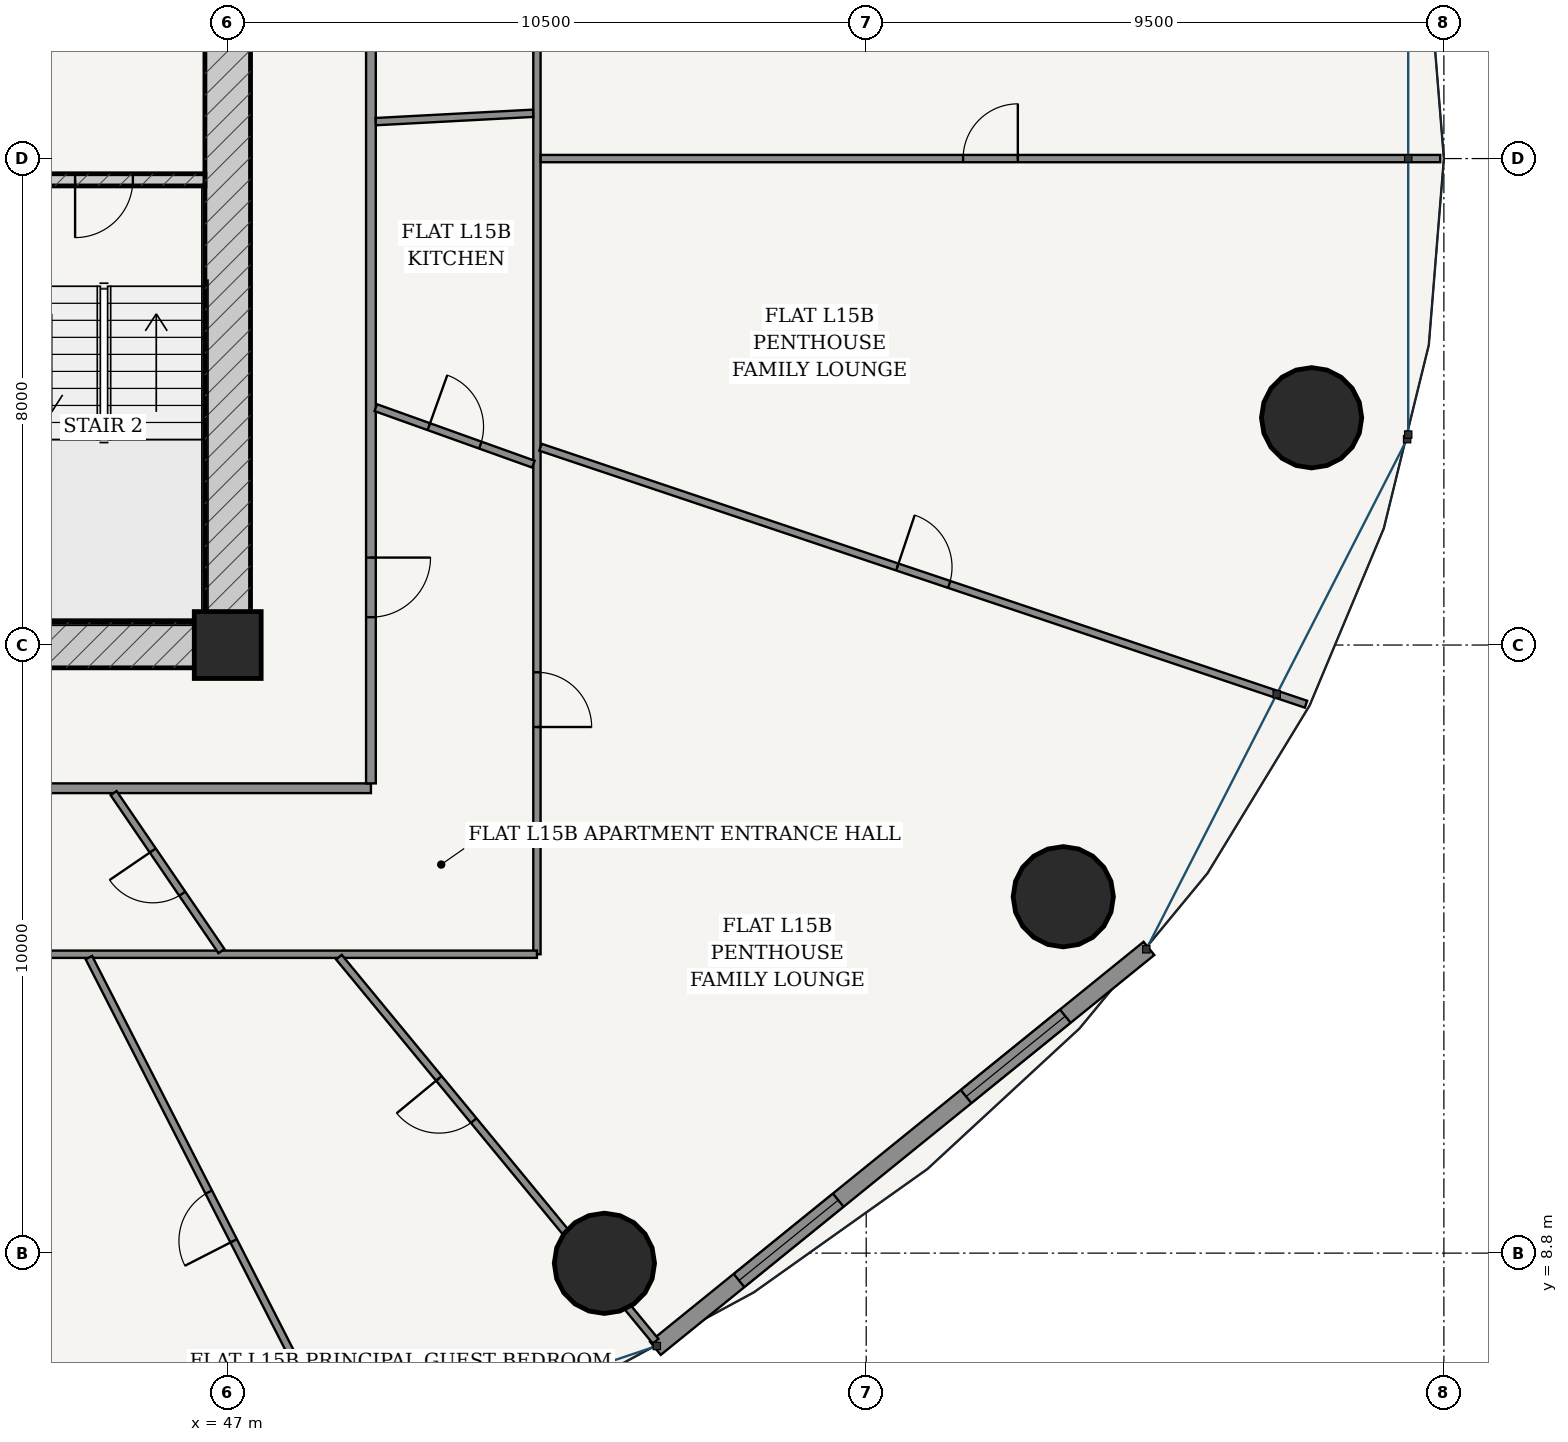
"""IFC4 building model, lengths in metres.
Left out: names, types, materials, properties, quantities, classifications, styles, units other than length and angle.
Written with IfcOpenShell. Run it as: python <this file> out.ifc"""

import sys

from ifc_helpers import new_model, si_unit, direction, frame, frame_2d, origin, origin_2d, place, context, subcontext, project, spatial, rectangle, hollow_circle, extrude, source, transform, mapped, element, fill, save


model = new_model("IFC4")
c1 = context("Model", 3, precision=1e-05, world=origin(), true_north=direction((-0.2419218956, 0.970295726276)))
c2 = subcontext(c1, "Body", "Model", "MODEL_VIEW")
j1 = project(units=[si_unit("LENGTHUNIT", "METRE"), si_unit("PLANEANGLEUNIT", "RADIAN")], contexts=[c1])
p1 = place(None, origin())
s1 = spatial("IfcSite", under=j1, at=p1, CompositionType="ELEMENT")
p2 = place(p1, origin())
s2 = spatial("IfcBuilding", under=s1, at=p2, CompositionType="ELEMENT")
p3 = place(p2, frame((0.0, 0.0, 60.0)))
s3 = spatial("IfcBuildingStorey", under=s2, at=p3, CompositionType="ELEMENT", Elevation=60.0)
p4 = place(p3, frame((47.0, 18.8, 0.0), z_axis=(0.0, 0.0, 1.0), x_axis=(1.0, 0.0, 0.0)))
e1 = element("IfcColumn", 1, at=p4, inside=s3, PredefinedType="COLUMN", context=c2, shape_type="SweptSolid", body=[
    extrude(rectangle(XDim=1.1, YDim=1.1, at=origin_2d()), origin(), (0.0, 0.0, 1.0), 3.6),
])
p5 = place(p3, frame((28.625, 18.8, 0.0), z_axis=(0.0, 0.0, 1.0), x_axis=(1.0, 0.0, 0.0)))
e2 = element("IfcWall", 2, at=p5, inside=s3, PredefinedType="SHEAR", context=c2, shape_type="SweptSolid", body=[
    extrude(rectangle(XDim=18.75, YDim=0.75, at=frame_2d((9.375, 0.0))), origin(), (0.0, 0.0, 1.0), 3.32),
])
p6 = place(p5, frame((8.95, 0.0, 0.0)))
e3 = element("IfcOpeningElement", 3, at=p6, cuts=e2, PredefinedType="OPENING", context=c2, shape_type="SweptSolid", body=[
    extrude(rectangle(XDim=0.85, YDim=2.1, at=frame_2d((0.425, 1.05))), frame((0.0, 0.385, 0.0), z_axis=(0.0, -1.0, 0.0), x_axis=(1.0, 0.0, 0.0)), (0.0, 0.0, 1.0), 0.77),
])
p7 = place(p3, frame((47.0, 19.175, 0.0), z_axis=(0.0, 0.0, 1.0), x_axis=(0.0, 1.0, 0.0)))
e4 = element("IfcWall", 4, at=p7, inside=s3, PredefinedType="SHEAR", context=c2, shape_type="SweptSolid", body=[
    extrude(rectangle(XDim=15.25, YDim=0.75, at=frame_2d((7.625, 0.0))), origin(), (0.0, 0.0, 1.0), 3.32),
])
p8 = place(p7, frame((9.875, 0.0, 0.0)))
e5 = element("IfcOpeningElement", 5, at=p8, cuts=e4, PredefinedType="OPENING", context=c2, shape_type="SweptSolid", body=[
    extrude(rectangle(XDim=1.5, YDim=2.2, at=frame_2d((0.75, 1.1))), frame((0.0, 0.385, 0.0), z_axis=(0.0, -1.0, 0.0), x_axis=(1.0, 0.0, 0.0)), (0.0, 0.0, 1.0), 0.77),
])
p9 = place(p3, frame((43.305, 26.45, 0.0), z_axis=(0.0, 0.0, 1.0), x_axis=(1.0, 0.0, 0.0)))
e6 = element("IfcWall", 6, at=p9, inside=s3, PredefinedType="SOLIDWALL", context=c2, shape_type="SweptSolid", body=[
    extrude(rectangle(XDim=3.32, YDim=0.2, at=frame_2d((1.66, 0.0))), origin(), (0.0, 0.0, 1.0), 3.32),
])
p10 = place(p9, frame((1.185, 0.0, 0.0)))
e7 = element("IfcOpeningElement", 7, at=p10, cuts=e6, PredefinedType="OPENING", context=c2, shape_type="SweptSolid", body=[
    extrude(rectangle(XDim=0.95, YDim=2.15, at=frame_2d((0.475, 1.075))), frame((0.0, 0.11, 0.0), z_axis=(0.0, -1.0, 0.0), x_axis=(1.0, 0.0, 0.0)), (0.0, 0.0, 1.0), 0.22),
])
for number, where, z_axis, x_axis in (
    (8, (53.195, 8.632, 0.0), (0.0, 0.0, 1.0), (1.0, 0.0, 0.0)),
    (9, (60.741, 14.661, 0.0), (0.0, 0.0, 1.0), (1.0, 0.0, 0.0)),
    (10, (64.824, 22.537, 0.0), (0.0, 0.0, 1.0), (1.0, 0.0, 0.0)),
):
    element("IfcColumn", number, at=place(p3, frame(where, z_axis=z_axis, x_axis=x_axis)), inside=s3, PredefinedType="COLUMN", context=c2, shape_type="SweptSolid", body=[
        extrude(hollow_circle(Radius=0.825, WallThickness=0.05, at=origin_2d()), origin(), (0.0, 0.0, 1.0), 3.6),
    ])
p11 = place(p3, frame((54.033, 7.235, 0.0), z_axis=(0.0, 0.0, 1.0), x_axis=(0.777016782851, 0.629479879875, 0.0)))
e11 = element("IfcWall", 11, at=p11, inside=s3, PredefinedType="SOLIDWALL", context=c2, shape_type="SweptSolid", body=[
    extrude(rectangle(XDim=10.447, YDim=0.28, at=frame_2d((5.223, 0.0))), origin(), (0.0, 0.0, 1.0), 3.32),
])
p12 = place(p11, frame((1.771, 0.0, 0.85)))
e12 = element("IfcOpeningElement", 12, at=p12, cuts=e11, PredefinedType="OPENING", context=c2, shape_type="SweptSolid", body=[
    extrude(rectangle(XDim=2.1, YDim=1.95, at=frame_2d((1.05, 0.975))), frame((0.0, 0.15, 0.0), z_axis=(0.0, -1.0, 0.0), x_axis=(1.0, 0.0, 0.0)), (0.0, 0.0, 1.0), 0.3),
])
p13 = place(p11, frame((6.576, 0.0, 0.85)))
e13 = element("IfcOpeningElement", 13, at=p13, cuts=e11, PredefinedType="OPENING", context=c2, shape_type="SweptSolid", body=[
    extrude(rectangle(XDim=2.1, YDim=1.95, at=frame_2d((1.05, 0.975))), frame((0.0, 0.15, 0.0), z_axis=(0.0, -1.0, 0.0), x_axis=(1.0, 0.0, 0.0)), (0.0, 0.0, 1.0), 0.3),
])
p14 = place(p3, frame((26.645, 16.445, 0.0), z_axis=(0.0, 0.0, 1.0), x_axis=(1.0, 0.0, 0.0)))
e14 = element("IfcWall", 14, at=p14, inside=s3, PredefinedType="PARTITIONING", context=c2, shape_type="SweptSolid", body=[
    extrude(rectangle(XDim=22.71, YDim=0.16, at=frame_2d((11.355, 0.0))), origin(), (0.0, 0.0, 1.0), 2.688),
])
p15 = place(p3, frame((49.355, 16.525, 0.0), z_axis=(0.0, 0.0, 1.0), x_axis=(0.0, 1.0, 0.0)))
e15 = element("IfcWall", 15, at=p15, inside=s3, PredefinedType="PARTITIONING", context=c2, shape_type="SweptSolid", body=[
    extrude(rectangle(XDim=20.55, YDim=0.16, at=frame_2d((10.275, 0.0))), origin(), (0.0, 0.0, 1.0), 2.688),
])
p16 = place(p15, frame((2.733, 0.0, 0.0)))
e16 = element("IfcOpeningElement", 16, at=p16, cuts=e15, PredefinedType="OPENING", context=c2, shape_type="SweptSolid", body=[
    extrude(rectangle(XDim=0.98, YDim=2.2, at=frame_2d((0.49, 1.1))), frame((0.0, 0.09, 0.0), z_axis=(0.0, -1.0, 0.0), x_axis=(1.0, 0.0, 0.0)), (0.0, 0.0, 1.0), 0.18),
])
p17 = place(p3, frame((52.085, 34.324, 0.0), z_axis=(0.0, 0.0, 1.0), x_axis=(0.0, -1.0, 0.0)))
e17 = element("IfcWall", 17, at=p17, inside=s3, PredefinedType="PARTITIONING", context=c2, shape_type="SweptSolid", body=[
    extrude(rectangle(XDim=20.609, YDim=0.12, at=frame_2d((10.305, 0.0))), origin(), (0.0, 0.0, 1.0), 2.688),
])
p18 = place(p17, frame((15.972, 0.0, 0.0)))
e18 = element("IfcOpeningElement", 18, at=p18, cuts=e17, PredefinedType="OPENING", context=c2, shape_type="SweptSolid", body=[
    extrude(rectangle(XDim=0.9, YDim=2.15, at=frame_2d((0.45, 1.075))), frame((0.0, 0.07, 0.0), z_axis=(0.0, -1.0, 0.0), x_axis=(1.0, 0.0, 0.0)), (0.0, 0.0, 1.0), 0.14),
])
p19 = place(p17, frame((3.058, 0.0, 0.0)))
e19 = element("IfcOpeningElement", 19, at=p19, cuts=e17, PredefinedType="OPENING", context=c2, shape_type="SweptSolid", body=[
    extrude(rectangle(XDim=0.9, YDim=2.15, at=frame_2d((0.45, 1.075))), frame((0.0, 0.07, 0.0), z_axis=(0.0, -1.0, 0.0), x_axis=(1.0, 0.0, 0.0)), (0.0, 0.0, 1.0), 0.14),
])
p20 = place(p3, frame((52.085, 13.715, 0.0), z_axis=(0.0, 0.0, 1.0), x_axis=(-1.0, 0.0, 0.0)))
e20 = element("IfcWall", 20, at=p20, inside=s3, PredefinedType="PARTITIONING", context=c2, shape_type="SweptSolid", body=[
    extrude(rectangle(XDim=28.17, YDim=0.12, at=frame_2d((14.085, 0.0))), origin(), (0.0, 0.0, 1.0), 2.688),
])
p21 = place(p20, frame((12.891, 0.0, 0.0)))
e21 = element("IfcOpeningElement", 21, at=p21, cuts=e20, PredefinedType="OPENING", context=c2, shape_type="SweptSolid", body=[
    extrude(rectangle(XDim=0.9, YDim=2.15, at=frame_2d((0.45, 1.075))), frame((0.0, 0.07, 0.0), z_axis=(0.0, -1.0, 0.0), x_axis=(1.0, 0.0, 0.0)), (0.0, 0.0, 1.0), 0.14),
])
p22 = place(p3, frame((44.717, 13.66, 0.0), z_axis=(0.0, 0.0, 1.0), x_axis=(0.455131303234, -0.890424335256, 0.0)))
e22 = element("IfcWall", 22, at=p22, inside=s3, PredefinedType="PARTITIONING", context=c2, shape_type="SweptSolid", body=[
    extrude(rectangle(XDim=9.562, YDim=0.12, at=frame_2d((4.781, 0.0))), origin(), (0.0, 0.0, 1.0), 2.762),
])
p23 = place(p22, frame((4.331, 0.0, 0.0)))
e23 = element("IfcOpeningElement", 23, at=p23, cuts=e22, PredefinedType="OPENING", context=c2, shape_type="SweptSolid", body=[
    extrude(rectangle(XDim=0.9, YDim=2.15, at=frame_2d((0.45, 1.075))), frame((0.0, 0.07, 0.0), z_axis=(0.0, -1.0, 0.0), x_axis=(1.0, 0.0, 0.0)), (0.0, 0.0, 1.0), 0.14),
])
p24 = place(p3, frame((48.829, 13.667, 0.0), z_axis=(0.0, 0.0, 1.0), x_axis=(0.636177533893, -0.771542704826, 0.0)))
e24 = element("IfcWall", 24, at=p24, inside=s3, PredefinedType="PARTITIONING", context=c2, shape_type="SweptSolid", body=[
    extrude(rectangle(XDim=8.187, YDim=0.12, at=frame_2d((4.093, 0.0))), origin(), (0.0, 0.0, 1.0), 2.688),
])
p25 = place(p24, frame((2.584, 0.0, 0.0)))
e25 = element("IfcOpeningElement", 25, at=p25, cuts=e24, PredefinedType="OPENING", context=c2, shape_type="SweptSolid", body=[
    extrude(rectangle(XDim=0.9, YDim=2.15, at=frame_2d((0.45, 1.075))), frame((0.0, 0.07, 0.0), z_axis=(0.0, -1.0, 0.0), x_axis=(1.0, 0.0, 0.0)), (0.0, 0.0, 1.0), 0.14),
])
p26 = place(p3, frame((52.144, 22.052, 0.0), z_axis=(0.0, 0.0, 1.0), x_axis=(0.948023034133, -0.318201707653, 0.0)))
e26 = element("IfcWall", 26, at=p26, inside=s3, PredefinedType="PARTITIONING", context=c2, shape_type="SweptSolid", body=[
    extrude(rectangle(XDim=13.279, YDim=0.12, at=frame_2d((6.639, 0.0))), origin(), (0.0, 0.0, 1.0), 2.762),
])
p27 = place(p26, frame((6.189, 0.0, 0.0)))
e27 = element("IfcOpeningElement", 27, at=p27, cuts=e26, PredefinedType="OPENING", context=c2, shape_type="SweptSolid", body=[
    extrude(rectangle(XDim=0.9, YDim=2.15, at=frame_2d((0.45, 1.075))), frame((0.0, 0.07, 0.0), z_axis=(0.0, -1.0, 0.0), x_axis=(1.0, 0.0, 0.0)), (0.0, 0.0, 1.0), 0.14),
])
p28 = place(p3, frame((52.147, 26.8, 0.0), z_axis=(0.0, 0.0, 1.0), x_axis=(1.0, 0.0, 0.0)))
e28 = element("IfcWall", 28, at=p28, inside=s3, PredefinedType="PARTITIONING", context=c2, shape_type="SweptSolid", body=[
    extrude(rectangle(XDim=14.793, YDim=0.12, at=frame_2d((7.396, 0.0))), origin(), (0.0, 0.0, 1.0), 2.762),
])
p29 = place(p28, frame((6.947, 0.0, 0.0)))
e29 = element("IfcOpeningElement", 29, at=p29, cuts=e28, PredefinedType="OPENING", context=c2, shape_type="SweptSolid", body=[
    extrude(rectangle(XDim=0.9, YDim=2.15, at=frame_2d((0.45, 1.075))), frame((0.0, 0.07, 0.0), z_axis=(0.0, -1.0, 0.0), x_axis=(1.0, 0.0, 0.0)), (0.0, 0.0, 1.0), 0.14),
])
p30 = place(p3, frame((45.123, 16.365, 0.0), z_axis=(0.0, 0.0, 1.0), x_axis=(0.563762888243, -0.825936683917, 0.0)))
e30 = element("IfcWall", 30, at=p30, inside=s3, PredefinedType="PARTITIONING", context=c2, shape_type="SweptSolid", body=[
    extrude(rectangle(XDim=3.146, YDim=0.12, at=frame_2d((1.573, 0.0))), origin(), (0.0, 0.0, 1.0), 3.32),
])
p31 = place(p30, frame((1.143, 0.0, 0.0)))
e31 = element("IfcOpeningElement", 31, at=p31, cuts=e30, PredefinedType="OPENING", context=c2, shape_type="SweptSolid", body=[
    extrude(rectangle(XDim=0.86, YDim=2.15, at=frame_2d((0.43, 1.075))), frame((0.0, 0.07, 0.0), z_axis=(0.0, -1.0, 0.0), x_axis=(1.0, 0.0, 0.0)), (0.0, 0.0, 1.0), 0.14),
])
p32 = place(p3, frame((49.435, 22.703, 0.0), z_axis=(0.0, 0.0, 1.0), x_axis=(0.941406362049, -0.337274460186, 0.0)))
e32 = element("IfcWall", 32, at=p32, inside=s3, PredefinedType="PARTITIONING", context=c2, shape_type="SweptSolid", body=[
    extrude(rectangle(XDim=2.753, YDim=0.12, at=frame_2d((1.376, 0.0))), origin(), (0.0, 0.0, 1.0), 3.32),
])
p33 = place(p32, frame((0.927, 0.0, 0.0)))
e33 = element("IfcOpeningElement", 33, at=p33, cuts=e32, PredefinedType="OPENING", context=c2, shape_type="SweptSolid", body=[
    extrude(rectangle(XDim=0.9, YDim=2.15, at=frame_2d((0.45, 1.075))), frame((0.0, 0.07, 0.0), z_axis=(0.0, -1.0, 0.0), x_axis=(1.0, 0.0, 0.0)), (0.0, 0.0, 1.0), 0.14),
])
p34 = place(p3, frame((49.435, 27.407, 0.0), z_axis=(0.0, 0.0, 1.0), x_axis=(0.998587742853, 0.053127392413, 0.0)))
e34 = element("IfcWall", 34, at=p34, inside=s3, PredefinedType="PARTITIONING", context=c2, shape_type="SweptSolid", body=[
    extrude(rectangle(XDim=2.592, YDim=0.12, at=frame_2d((1.296, 0.0))), origin(), (0.0, 0.0, 1.0), 3.32),
])
m1 = source(origin(), c2, "Body", "SweptSolid", [
    extrude(rectangle(XDim=2.1, YDim=1.95, at=frame_2d((1.05, 0.975))), frame((0.0, 0.03, 0.0), z_axis=(0.0, -1.0, 0.0), x_axis=(1.0, 0.0, 0.0)), (0.0, 0.0, 1.0), 0.06),
])
p35 = place(p12, origin())
e35 = element("IfcWindow", 35, at=p35, inside=s3, PartitioningType="SINGLE_PANEL", PredefinedType="WINDOW", context=c2, shape_type="MappedRepresentation", body=[
    mapped(m1, transform((0.0, 0.0, 0.0), scale=1.0)),
])
fill(e12, e35)
p36 = place(p13, origin())
e36 = element("IfcWindow", 36, at=p36, inside=s3, PartitioningType="SINGLE_PANEL", PredefinedType="WINDOW", context=c2, shape_type="MappedRepresentation", body=[
    mapped(m1, transform((0.0, 0.0, 0.0), scale=1.0)),
])
fill(e13, e36)
m2 = source(origin(), c2, "Body", "SweptSolid", [
    extrude(rectangle(XDim=0.95, YDim=2.15, at=frame_2d((0.475, 1.075))), frame((0.0, 0.025, 0.0), z_axis=(0.0, -1.0, 0.0), x_axis=(1.0, 0.0, 0.0)), (0.0, 0.0, 1.0), 0.05),
])
p37 = place(p10, frame((0.95, 0.0, 0.0), z_axis=(0.0, 0.0, 1.0), x_axis=(-1.0, 0.0, 0.0)))
e37 = element("IfcDoor", 37, at=p37, inside=s3, OperationType="SINGLE_SWING_RIGHT", PredefinedType="DOOR", context=c2, shape_type="MappedRepresentation", body=[
    mapped(m2, transform((0.0, 0.0, 0.0), scale=1.0)),
])
fill(e7, e37)
m3 = source(origin(), c2, "Body", "SweptSolid", [
    extrude(rectangle(XDim=0.98, YDim=2.2, at=frame_2d((0.49, 1.1))), frame((0.0, 0.025, 0.0), z_axis=(0.0, -1.0, 0.0), x_axis=(1.0, 0.0, 0.0)), (0.0, 0.0, 1.0), 0.05),
])
p38 = place(p16, frame((0.98, 0.0, 0.0), z_axis=(0.0, 0.0, 1.0), x_axis=(-1.0, 0.0, 0.0)))
e38 = element("IfcDoor", 38, at=p38, inside=s3, OperationType="SINGLE_SWING_LEFT", PredefinedType="DOOR", context=c2, shape_type="MappedRepresentation", body=[
    mapped(m3, transform((0.0, 0.0, 0.0), scale=1.0)),
])
fill(e16, e38)
m4 = source(origin(), c2, "Body", "SweptSolid", [
    extrude(rectangle(XDim=0.86, YDim=2.15, at=frame_2d((0.43, 1.075))), frame((0.0, 0.025, 0.0), z_axis=(0.0, -1.0, 0.0), x_axis=(1.0, 0.0, 0.0)), (0.0, 0.0, 1.0), 0.05),
])
p39 = place(p31, frame((0.86, 0.0, 0.0), z_axis=(0.0, 0.0, 1.0), x_axis=(-1.0, 0.0, 0.0)))
e39 = element("IfcDoor", 39, at=p39, inside=s3, OperationType="SINGLE_SWING_RIGHT", PredefinedType="DOOR", context=c2, shape_type="MappedRepresentation", body=[
    mapped(m4, transform((0.0, 0.0, 0.0), scale=1.0)),
])
fill(e31, e39)
m5 = source(origin(), c2, "Body", "SweptSolid", [
    extrude(rectangle(XDim=0.9, YDim=2.15, at=frame_2d((0.45, 1.075))), frame((0.0, 0.025, 0.0), z_axis=(0.0, -1.0, 0.0), x_axis=(1.0, 0.0, 0.0)), (0.0, 0.0, 1.0), 0.05),
])
p40 = place(p33, origin())
e40 = element("IfcDoor", 40, at=p40, inside=s3, OperationType="SINGLE_SWING_LEFT", PredefinedType="DOOR", context=c2, shape_type="MappedRepresentation", body=[
    mapped(m5, transform((0.0, 0.0, 0.0), scale=1.0)),
])
fill(e33, e40)
p41 = place(p18, origin())
e41 = element("IfcDoor", 41, at=p41, inside=s3, OperationType="SINGLE_SWING_RIGHT", PredefinedType="DOOR", context=c2, shape_type="MappedRepresentation", body=[
    mapped(m5, transform((0.0, 0.0, 0.0), scale=1.0)),
])
fill(e18, e41)
p42 = place(p27, origin())
e42 = element("IfcDoor", 42, at=p42, inside=s3, OperationType="SINGLE_SWING_LEFT", PredefinedType="DOOR", context=c2, shape_type="MappedRepresentation", body=[
    mapped(m5, transform((0.0, 0.0, 0.0), scale=1.0)),
])
fill(e27, e42)
p43 = place(p29, origin())
e43 = element("IfcDoor", 43, at=p43, inside=s3, OperationType="SINGLE_SWING_RIGHT", PredefinedType="DOOR", context=c2, shape_type="MappedRepresentation", body=[
    mapped(m5, transform((0.0, 0.0, 0.0), scale=1.0)),
])
fill(e29, e43)
p44 = place(p25, frame((0.9, 0.0, 0.0), z_axis=(0.0, 0.0, 1.0), x_axis=(-1.0, 0.0, 0.0)))
e44 = element("IfcDoor", 44, at=p44, inside=s3, OperationType="SINGLE_SWING_RIGHT", PredefinedType="DOOR", context=c2, shape_type="MappedRepresentation", body=[
    mapped(m5, transform((0.0, 0.0, 0.0), scale=1.0)),
])
fill(e25, e44)
p45 = place(p23, frame((0.9, 0.0, 0.0), z_axis=(0.0, 0.0, 1.0), x_axis=(-1.0, 0.0, 0.0)))
e45 = element("IfcDoor", 45, at=p45, inside=s3, OperationType="SINGLE_SWING_LEFT", PredefinedType="DOOR", context=c2, shape_type="MappedRepresentation", body=[
    mapped(m5, transform((0.0, 0.0, 0.0), scale=1.0)),
])
fill(e23, e45)
save(model, sys.argv[1])
